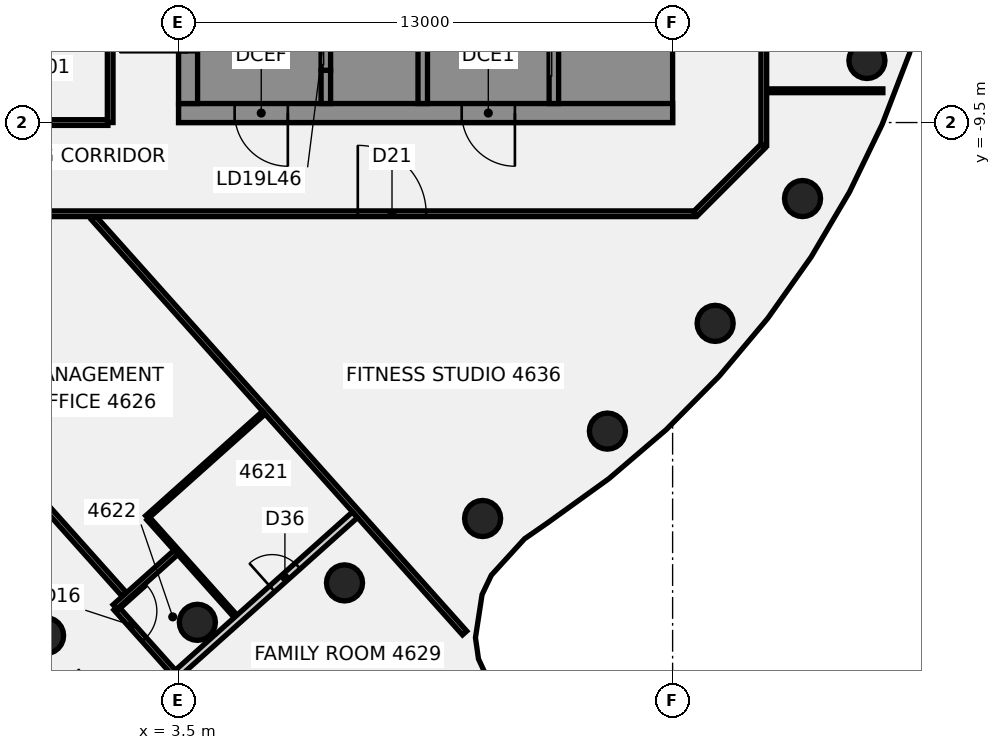
"""IFC4 building model, lengths in metres.
Left out: names, types, materials, properties, quantities, classifications, styles, units other than length and angle.
Written with IfcOpenShell. Run it as: python <this file> out.ifc"""

import sys

from ifc_helpers import new_model, si_unit, direction, frame, frame_2d, origin, origin_2d, place, context, subcontext, project, spatial, polyline, rectangle, circle, outline, extrude, element, fill, save


model = new_model("IFC4")
c1 = context("Model", 3, precision=1e-05, world=origin(), true_north=direction((0.0, 1.0)))
c2 = subcontext(c1, "Body", "Model", "MODEL_VIEW")
j1 = project(units=[si_unit("LENGTHUNIT", "METRE"), si_unit("PLANEANGLEUNIT", "RADIAN")], contexts=[c1])
p1 = place(None, origin())
s1 = spatial("IfcSite", under=j1, at=p1, CompositionType="ELEMENT")
p2 = place(p1, origin())
s2 = spatial("IfcBuilding", under=s1, at=p2, CompositionType="ELEMENT")
p3 = place(p2, frame((0.0, 0.0, 186.1)))
s3 = spatial("IfcBuildingStorey", under=s2, at=p3, CompositionType="ELEMENT", Elevation=186.1)
for number, where, z_axis, x_axis in (
    (1, (0.0, -23.0, -0.14), (0.0, 0.0, 1.0), (1.0, 0.0, 0.0)),
    (2, (3.994, -22.651, -0.14), (0.0, 0.0, 1.0), (1.0, 0.0, 0.0)),
    (3, (7.866, -21.613, -0.14), (0.0, 0.0, 1.0), (1.0, 0.0, 0.0)),
    (4, (11.5, -19.919, -0.14), (0.0, 0.0, 1.0), (1.0, 0.0, 0.0)),
    (5, (14.784, -17.619, -0.14), (0.0, 0.0, 1.0), (1.0, 0.0, 0.0)),
    (6, (17.619, -14.784, -0.14), (0.0, 0.0, 1.0), (1.0, 0.0, 0.0)),
    (7, (19.919, -11.5, -0.14), (0.0, 0.0, 1.0), (1.0, 0.0, 0.0)),
    (8, (21.613, -7.866, -0.14), (0.0, 0.0, 1.0), (1.0, 0.0, 0.0)),
):
    element("IfcColumn", number, at=place(p3, frame(where, z_axis=z_axis, x_axis=x_axis)), inside=s3, PredefinedType="COLUMN", context=c2, shape_type="SweptSolid", body=[
        extrude(circle(Radius=0.475, at=origin_2d()), origin(), (0.0, 0.0, 1.0), 3.6),
    ])
p4 = place(p3, frame((9.632, -24.523, -0.139), z_axis=(0.012268116842, 0.048801348764, 0.99873315839), x_axis=(-0.744800990849, -0.66598299183, 0.041690989716)))
e9 = element("IfcColumn", 9, at=p4, inside=s3, PredefinedType="COLUMN", context=c2, shape_type="SweptSolid", body=[
    extrude(rectangle(XDim=0.9, YDim=0.9, at=origin_2d()), origin(), (0.0, 0.0, 1.0), 3.602),
])
p5 = place(p3, frame((-6.785, -12.008, 0.0), z_axis=(0.0, 0.0, 1.0), x_axis=(0.666416805169, -0.745579400056, 0.0)))
e10 = element("IfcWall", 10, at=p5, inside=s3, PredefinedType="PARTITIONING", context=c2, shape_type="SweptSolid", body=[
    extrude(rectangle(XDim=13.292, YDim=0.15, at=frame_2d((6.646, 0.0))), origin(), (0.0, 0.0, 1.0), 2.864),
])
p6 = place(p5, frame((4.355, 0.0, 0.0)))
e11 = element("IfcOpeningElement", 11, at=p6, cuts=e10, PredefinedType="OPENING", context=c2, shape_type="SweptSolid", body=[
    extrude(rectangle(XDim=0.9, YDim=2.1, at=frame_2d((0.45, 1.05))), frame((0.0, 0.085, 0.0), z_axis=(0.0, -1.0, 0.0), x_axis=(1.0, 0.0, 0.0)), (0.0, 0.0, 1.0), 0.17),
])
p7 = place(p3, frame((1.263, -12.008, 0.0), z_axis=(0.0, 0.0, 1.0), x_axis=(0.666447481512, -0.745551979668, 0.0)))
e12 = element("IfcWall", 12, at=p7, inside=s3, PredefinedType="PARTITIONING", context=c2, shape_type="SweptSolid", body=[
    extrude(rectangle(XDim=14.651, YDim=0.15, at=frame_2d((7.325, 0.0))), origin(), (0.0, 0.0, 1.0), 2.864),
])
p8 = place(p3, frame((1.855, -22.274, 0.0), z_axis=(0.0, 0.0, 1.0), x_axis=(0.666398150621, -0.74559607352, 0.0)))
e13 = element("IfcWall", 13, at=p8, inside=s3, PredefinedType="PARTITIONING", context=c2, shape_type="SweptSolid", body=[
    extrude(rectangle(XDim=15.78, YDim=0.15, at=frame_2d((7.89, 0.0))), origin(), (0.0, 0.0, 1.0), 2.864),
])
p9 = place(p8, frame((0.11, 0.0, 0.0)))
e14 = element("IfcOpeningElement", 14, at=p9, cuts=e13, PredefinedType="OPENING", context=c2, shape_type="SweptSolid", body=[
    extrude(rectangle(XDim=1.0, YDim=2.1, at=frame_2d((0.5, 1.05))), frame((0.0, 0.085, 0.0), z_axis=(0.0, -1.0, 0.0), x_axis=(1.0, 0.0, 0.0)), (0.0, 0.0, 1.0), 0.17),
])
p10 = place(p8, frame((6.26, 0.0, 0.0)))
e15 = element("IfcOpeningElement", 15, at=p10, cuts=e13, PredefinedType="OPENING", context=c2, shape_type="SweptSolid", body=[
    extrude(rectangle(XDim=0.9, YDim=2.1, at=frame_2d((0.45, 1.05))), frame((0.0, 0.085, 0.0), z_axis=(0.0, -1.0, 0.0), x_axis=(1.0, 0.0, 0.0)), (0.0, 0.0, 1.0), 0.17),
])
p11 = place(p8, frame((14.31, 0.0, 0.0)))
e16 = element("IfcOpeningElement", 16, at=p11, cuts=e13, PredefinedType="OPENING", context=c2, shape_type="SweptSolid", body=[
    extrude(rectangle(XDim=0.9, YDim=2.1, at=frame_2d((0.45, 1.05))), frame((0.0, 0.085, 0.0), z_axis=(0.0, -1.0, 0.0), x_axis=(1.0, 0.0, 0.0)), (0.0, 0.0, 1.0), 0.17),
])
p12 = place(p3, frame((2.705, -19.924, 0.0), z_axis=(0.0, 0.0, 1.0), x_axis=(0.666455053582, -0.74554521094, 0.0)))
e17 = element("IfcWall", 17, at=p12, inside=s3, PredefinedType="PARTITIONING", context=c2, shape_type="SweptSolid", body=[
    extrude(rectangle(XDim=3.445, YDim=0.1, at=frame_2d((1.722, 0.0))), origin(), (0.0, 0.0, 1.0), 2.864),
])
p13 = place(p3, frame((-17.1, -11.9, 0.0), z_axis=(0.0, 0.0, 1.0), x_axis=(1.0, 0.0, 0.0)))
e18 = element("IfcWall", 18, at=p13, inside=s3, PredefinedType="PARTITIONING", context=c2, shape_type="SweptSolid", body=[
    extrude(rectangle(XDim=34.165, YDim=0.15, at=frame_2d((17.083, 0.0))), origin(), (0.0, 0.0, 1.0), 2.864),
])
p14 = place(p13, frame((7.992, 0.0, 0.0)))
e19 = element("IfcOpeningElement", 19, at=p14, cuts=e18, PredefinedType="OPENING", context=c2, shape_type="SweptSolid", body=[
    extrude(rectangle(XDim=1.8, YDim=2.1, at=frame_2d((0.9, 1.05))), frame((0.0, 0.085, 0.0), z_axis=(0.0, -1.0, 0.0), x_axis=(1.0, 0.0, 0.0)), (0.0, 0.0, 1.0), 0.17),
])
p15 = place(p13, frame((2.1, 0.0, 0.0)))
e20 = element("IfcOpeningElement", 20, at=p15, cuts=e18, PredefinedType="OPENING", context=c2, shape_type="SweptSolid", body=[
    extrude(rectangle(XDim=1.8, YDim=2.1, at=frame_2d((0.9, 1.05))), frame((0.0, 0.085, 0.0), z_axis=(0.0, -1.0, 0.0), x_axis=(1.0, 0.0, 0.0)), (0.0, 0.0, 1.0), 0.17),
])
p16 = place(p13, frame((25.316, 0.0, 0.0)))
e21 = element("IfcOpeningElement", 21, at=p16, cuts=e18, PredefinedType="OPENING", context=c2, shape_type="SweptSolid", body=[
    extrude(rectangle(XDim=1.8, YDim=2.1, at=frame_2d((0.9, 1.05))), frame((0.0, 0.085, 0.0), z_axis=(0.0, -1.0, 0.0), x_axis=(1.0, 0.0, 0.0)), (0.0, 0.0, 1.0), 0.17),
])
p17 = place(p3, frame((-1.64, -9.5, 0.0), z_axis=(0.0, 0.0, 1.0), x_axis=(1.0, 0.0, 0.0)))
e22 = element("IfcWall", 22, at=p17, inside=s3, PredefinedType="PARTITIONING", context=c2, shape_type="SweptSolid", body=[
    extrude(rectangle(XDim=3.28, YDim=0.15, at=frame_2d((1.64, 0.0))), origin(), (0.0, 0.0, 1.0), 2.864),
])
p18 = place(p3, frame((18.955, -8.664, 0.0), z_axis=(0.0, 0.0, 1.0), x_axis=(1.0, 0.0, 0.0)))
e23 = element("IfcWall", 23, at=p18, inside=s3, PredefinedType="PARTITIONING", context=c2, shape_type="SweptSolid", body=[
    extrude(rectangle(XDim=3.078, YDim=0.1, at=frame_2d((1.539, 0.0))), origin(), (0.0, 0.0, 1.0), 2.864),
])
p19 = place(p3, frame((2.668, -19.883, 0.0), z_axis=(0.0, 0.0, 1.0), x_axis=(0.745587906821, 0.666407287777, 0.0)))
e24 = element("IfcWall", 24, at=p19, inside=s3, PredefinedType="PARTITIONING", context=c2, shape_type="SweptSolid", body=[
    extrude(rectangle(XDim=4.125, YDim=0.1, at=frame_2d((2.063, 0.0))), origin(), (0.0, 0.0, 1.0), 2.864),
])
p20 = place(p3, frame((-2.388, -29.231, 0.0), z_axis=(0.0, 0.0, 1.0), x_axis=(0.745635079119, 0.666354506841, 0.0)))
e25 = element("IfcWall", 25, at=p20, inside=s3, PredefinedType="PARTITIONING", context=c2, shape_type="SweptSolid", body=[
    extrude(rectangle(XDim=14.119, YDim=0.2, at=frame_2d((7.06, 0.0))), origin(), (0.0, 0.0, 1.0), 2.864),
])
p21 = place(p20, frame((5.699, 0.0, 0.0)))
e26 = element("IfcOpeningElement", 26, at=p21, cuts=e25, PredefinedType="OPENING", context=c2, shape_type="SweptSolid", body=[
    extrude(rectangle(XDim=1.4, YDim=2.1, at=frame_2d((0.7, 1.05))), frame((0.0, 0.11, 0.0), z_axis=(0.0, -1.0, 0.0), x_axis=(1.0, 0.0, 0.0)), (0.0, 0.0, 1.0), 0.22),
])
p22 = place(p20, frame((11.199, 0.0, 0.0)))
e27 = element("IfcOpeningElement", 27, at=p22, cuts=e25, PredefinedType="OPENING", context=c2, shape_type="SweptSolid", body=[
    extrude(rectangle(XDim=0.9, YDim=2.1, at=frame_2d((0.45, 1.05))), frame((0.0, 0.11, 0.0), z_axis=(0.0, -1.0, 0.0), x_axis=(1.0, 0.0, 0.0)), (0.0, 0.0, 1.0), 0.22),
])
p23 = place(p20, frame((1.579, 0.0, 0.0)))
e28 = element("IfcOpeningElement", 28, at=p23, cuts=e25, PredefinedType="OPENING", context=c2, shape_type="SweptSolid", body=[
    extrude(rectangle(XDim=0.9, YDim=2.1, at=frame_2d((0.45, 1.05))), frame((0.0, 0.11, 0.0), z_axis=(0.0, -1.0, 0.0), x_axis=(1.0, 0.0, 0.0)), (0.0, 0.0, 1.0), 0.22),
])
p24 = place(p3, frame((1.827, -22.243, 0.0), z_axis=(0.0, 0.0, 1.0), x_axis=(0.74553667449, 0.666464602953, 0.0)))
e29 = element("IfcWall", 29, at=p24, inside=s3, PredefinedType="PARTITIONING", context=c2, shape_type="SweptSolid", body=[
    extrude(rectangle(XDim=2.14, YDim=0.15, at=frame_2d((1.07, 0.0))), origin(), (0.0, 0.0, 1.0), 2.864),
])
p25 = place(p3, frame((17.1, -11.9, 0.0), z_axis=(0.0, 0.0, 1.0), x_axis=(0.707106781187, 0.707106781187, 0.0)))
e30 = element("IfcWall", 30, at=p25, inside=s3, PredefinedType="PARTITIONING", context=c2, shape_type="SweptSolid", body=[
    extrude(rectangle(XDim=2.505, YDim=0.15, at=frame_2d((1.253, 0.0))), origin(), (0.0, 0.0, 1.0), 2.864),
])
p26 = place(p3, frame((1.7, -9.5, 0.0), z_axis=(0.0, 0.0, 1.0), x_axis=(0.0, 1.0, 0.0)))
e31 = element("IfcWall", 31, at=p26, inside=s3, PredefinedType="PARTITIONING", context=c2, shape_type="SweptSolid", body=[
    extrude(rectangle(XDim=19.0, YDim=0.15, at=frame_2d((9.5, 0.0))), origin(), (0.0, 0.0, 1.0), 2.864),
])
p27 = place(p3, frame((18.9, -10.1, 0.0), z_axis=(0.0, 0.0, 1.0), x_axis=(0.0, 1.0, 0.0)))
e32 = element("IfcWall", 32, at=p27, inside=s3, PredefinedType="PARTITIONING", context=c2, shape_type="SweptSolid", body=[
    extrude(rectangle(XDim=20.2, YDim=0.15, at=frame_2d((10.1, 0.0))), origin(), (0.0, 0.0, 1.0), 2.864),
])
p28 = place(p27, frame((18.232, 0.0, 0.0)))
e33 = element("IfcOpeningElement", 33, at=p28, cuts=e32, PredefinedType="OPENING", context=c2, shape_type="SweptSolid", body=[
    extrude(rectangle(XDim=0.9, YDim=2.1, at=frame_2d((0.45, 1.05))), frame((0.0, 0.085, 0.0), z_axis=(0.0, -1.0, 0.0), x_axis=(1.0, 0.0, 0.0)), (0.0, 0.0, 1.0), 0.17),
])
p29 = place(p27, frame((10.286, 0.0, 0.0)))
e34 = element("IfcOpeningElement", 34, at=p29, cuts=e32, PredefinedType="OPENING", context=c2, shape_type="SweptSolid", body=[
    extrude(rectangle(XDim=1.8, YDim=2.1, at=frame_2d((0.9, 1.05))), frame((0.0, 0.085, 0.0), z_axis=(0.0, -1.0, 0.0), x_axis=(1.0, 0.0, 0.0)), (0.0, 0.0, 1.0), 0.17),
])
p30 = place(p27, frame((5.486, 0.0, 0.0)))
e35 = element("IfcOpeningElement", 35, at=p30, cuts=e32, PredefinedType="OPENING", context=c2, shape_type="SweptSolid", body=[
    extrude(rectangle(XDim=1.8, YDim=2.1, at=frame_2d((0.9, 1.05))), frame((0.0, 0.085, 0.0), z_axis=(0.0, -1.0, 0.0), x_axis=(1.0, 0.0, 0.0)), (0.0, 0.0, 1.0), 0.17),
])
p31 = place(p3, frame((16.5, -9.25, 0.0), z_axis=(0.0, 0.0, 1.0), x_axis=(-1.0, 0.0, 0.0)))
e36 = element("IfcWall", 36, at=p31, inside=s3, PredefinedType="SHEAR", context=c2, shape_type="SweptSolid", body=[
    extrude(rectangle(XDim=13.0, YDim=0.5, at=frame_2d((6.5, 0.0))), origin(), (0.0, 0.0, 1.0), 3.46),
])
p32 = place(p31, frame((4.15, 0.0, 0.0)))
e37 = element("IfcOpeningElement", 37, at=p32, cuts=e36, PredefinedType="OPENING", context=c2, shape_type="SweptSolid", body=[
    extrude(rectangle(XDim=1.4, YDim=2.1, at=frame_2d((0.7, 1.05))), frame((0.0, 0.26, 0.0), z_axis=(0.0, -1.0, 0.0), x_axis=(1.0, 0.0, 0.0)), (0.0, 0.0, 1.0), 0.52),
])
p33 = place(p31, frame((10.125, 0.0, 0.0)))
e38 = element("IfcOpeningElement", 38, at=p33, cuts=e36, PredefinedType="OPENING", context=c2, shape_type="SweptSolid", body=[
    extrude(rectangle(XDim=1.4, YDim=2.1, at=frame_2d((0.7, 1.05))), frame((0.0, 0.26, 0.0), z_axis=(0.0, -1.0, 0.0), x_axis=(1.0, 0.0, 0.0)), (0.0, 0.0, 1.0), 0.52),
])
p34 = place(p3, origin())
e39 = element("IfcWall", 39, at=p34, inside=s3, PredefinedType="SHEAR", context=c2, shape_type="SweptSolid", body=[
    extrude(outline(polyline([(13.5, -8.125), (13.5, -9.0), (16.0, -9.0), (16.5, -9.0), (16.5, 9.0), (16.0, 9.0), (13.5, 9.0), (13.5, 8.125), (16.0, 8.125), (16.0, 5.625), (13.5, 5.625), (13.5, 5.375), (16.0, 5.375), (16.0, -5.375), (13.5, -5.375), (13.5, -5.625), (16.0, -5.625), (16.0, -8.125), (13.5, -8.125)])), origin(), (0.0, 0.0, 1.0), 3.46),
])
p35 = place(p3, origin())
e40 = element("IfcWall", 40, at=p35, inside=s3, PredefinedType="SHEAR", context=c2, shape_type="SweptSolid", body=[
    extrude(outline(polyline([(7.5, -8.125), (7.5, -9.0), (9.8, -9.0), (9.8, -8.125), (9.8, -5.625), (9.55, -5.625), (9.55, -8.125), (7.5, -8.125)])), origin(), (0.0, 0.0, 1.0), 3.46),
])
p36 = place(p3, frame((7.375, -9.0, 0.0), z_axis=(0.0, 0.0, 1.0), x_axis=(0.0, 1.0, 0.0)))
e41 = element("IfcWall", 41, at=p36, inside=s3, PredefinedType="SHEAR", context=c2, shape_type="SweptSolid", body=[
    extrude(rectangle(XDim=0.875, YDim=0.25, at=frame_2d((0.438, 0.0))), origin(), (0.0, 0.0, 1.0), 3.46),
])
p37 = place(p3, frame((13.375, -9.0, 0.0), z_axis=(0.0, 0.0, 1.0), x_axis=(0.0, 1.0, 0.0)))
e42 = element("IfcWall", 42, at=p37, inside=s3, PredefinedType="SHEAR", context=c2, shape_type="SweptSolid", body=[
    extrude(rectangle(XDim=18.0, YDim=0.25, at=frame_2d((9.0, 0.0))), origin(), (0.0, 0.0, 1.0), 3.46),
])
p38 = place(p37, frame((1.425, 0.0, 0.0)))
e43 = element("IfcOpeningElement", 43, at=p38, cuts=e42, PredefinedType="OPENING", context=c2, shape_type="SweptSolid", body=[
    extrude(rectangle(XDim=1.4, YDim=2.1, at=frame_2d((0.7, 1.05))), frame((0.0, 0.135, 0.0), z_axis=(0.0, -1.0, 0.0), x_axis=(1.0, 0.0, 0.0)), (0.0, 0.0, 1.0), 0.27),
])
p39 = place(p37, frame((8.5, 0.0, 0.0)))
e44 = element("IfcOpeningElement", 44, at=p39, cuts=e42, PredefinedType="OPENING", context=c2, shape_type="SweptSolid", body=[
    extrude(rectangle(XDim=1.0, YDim=2.1, at=frame_2d((0.5, 1.05))), frame((0.0, 0.135, 0.0), z_axis=(0.0, -1.0, 0.0), x_axis=(1.0, 0.0, 0.0)), (0.0, 0.0, 1.0), 0.27),
])
p40 = place(p3, frame((9.925, -9.0, 0.0), z_axis=(0.0, 0.0, 1.0), x_axis=(0.0, 1.0, 0.0)))
e45 = element("IfcWall", 45, at=p40, inside=s3, PredefinedType="SHEAR", context=c2, shape_type="SweptSolid", body=[
    extrude(rectangle(XDim=18.0, YDim=0.25, at=frame_2d((9.0, 0.0))), origin(), (0.0, 0.0, 1.0), 3.46),
])
p41 = place(p40, frame((4.275, 0.0, 0.0)))
e46 = element("IfcOpeningElement", 46, at=p41, cuts=e45, PredefinedType="OPENING", context=c2, shape_type="SweptSolid", body=[
    extrude(rectangle(XDim=1.2, YDim=2.1, at=frame_2d((0.6, 1.05))), frame((0.0, 0.135, 0.0), z_axis=(0.0, -1.0, 0.0), x_axis=(1.0, 0.0, 0.0)), (0.0, 0.0, 1.0), 0.27),
])
p42 = place(p40, frame((7.025, 0.0, 0.0)))
e47 = element("IfcOpeningElement", 47, at=p42, cuts=e45, PredefinedType="OPENING", context=c2, shape_type="SweptSolid", body=[
    extrude(rectangle(XDim=1.2, YDim=2.1, at=frame_2d((0.6, 1.05))), frame((0.0, 0.135, 0.0), z_axis=(0.0, -1.0, 0.0), x_axis=(1.0, 0.0, 0.0)), (0.0, 0.0, 1.0), 0.27),
])
p43 = place(p40, frame((9.825, 0.0, 0.0)))
e48 = element("IfcOpeningElement", 48, at=p43, cuts=e45, PredefinedType="OPENING", context=c2, shape_type="SweptSolid", body=[
    extrude(rectangle(XDim=1.1, YDim=2.1, at=frame_2d((0.55, 1.05))), frame((0.0, 0.135, 0.0), z_axis=(0.0, -1.0, 0.0), x_axis=(1.0, 0.0, 0.0)), (0.0, 0.0, 1.0), 0.27),
])
p44 = place(p3, frame((7.375, -8.125, 0.0), z_axis=(0.0, 0.0, 1.0), x_axis=(0.0, 1.0, 0.0)))
e49 = element("IfcWall", 49, at=p44, inside=s3, PredefinedType="SHEAR", context=c2, shape_type="SweptSolid", body=[
    extrude(rectangle(XDim=2.5, YDim=0.25, at=frame_2d((1.25, 0.0))), origin(), (0.0, 0.0, 1.0), 3.46),
])
p45 = place(p44, frame((0.7, 0.0, 0.0)))
e50 = element("IfcOpeningElement", 50, at=p45, cuts=e49, PredefinedType="OPENING", context=c2, shape_type="SweptSolid", body=[
    extrude(rectangle(XDim=1.1, YDim=2.1, at=frame_2d((0.55, 1.05))), frame((0.0, 0.135, 0.0), z_axis=(0.0, -1.0, 0.0), x_axis=(1.0, 0.0, 0.0)), (0.0, 0.0, 1.0), 0.27),
])
p46 = place(p3, frame((3.75, -9.0, 0.0), z_axis=(0.0, 0.0, 1.0), x_axis=(0.0, 1.0, 0.0)))
e51 = element("IfcWall", 51, at=p46, inside=s3, PredefinedType="SHEAR", context=c2, shape_type="SweptSolid", body=[
    extrude(rectangle(XDim=18.0, YDim=0.5, at=frame_2d((9.0, 0.0))), origin(), (0.0, 0.0, 1.0), 3.46),
])
p47 = place(p46, frame((1.35, 0.0, 0.0)))
e52 = element("IfcOpeningElement", 52, at=p47, cuts=e51, PredefinedType="OPENING", context=c2, shape_type="SweptSolid", body=[
    extrude(rectangle(XDim=1.8, YDim=2.1, at=frame_2d((0.9, 1.05))), frame((0.0, 0.26, 0.0), z_axis=(0.0, -1.0, 0.0), x_axis=(1.0, 0.0, 0.0)), (0.0, 0.0, 1.0), 0.52),
])
p48 = place(p46, frame((11.798, 0.0, 0.0)))
e53 = element("IfcOpeningElement", 53, at=p48, cuts=e51, PredefinedType="OPENING", context=c2, shape_type="SweptSolid", body=[
    extrude(rectangle(XDim=1.0, YDim=2.1, at=frame_2d((0.5, 1.05))), frame((0.0, 0.26, 0.0), z_axis=(0.0, -1.0, 0.0), x_axis=(1.0, 0.0, 0.0)), (0.0, 0.0, 1.0), 0.52),
])
p49 = place(p46, frame((15.323, 0.0, 0.0)))
e54 = element("IfcOpeningElement", 54, at=p49, cuts=e51, PredefinedType="OPENING", context=c2, shape_type="SweptSolid", body=[
    extrude(rectangle(XDim=1.0, YDim=2.1, at=frame_2d((0.5, 1.05))), frame((0.0, 0.26, 0.0), z_axis=(0.0, -1.0, 0.0), x_axis=(1.0, 0.0, 0.0)), (0.0, 0.0, 1.0), 0.52),
])
p50 = place(p9, origin())
e55 = element("IfcDoor", 55, at=p50, inside=s3, OperationType="SINGLE_SWING_RIGHT", PredefinedType="DOOR", context=c2, shape_type="SweptSolid", body=[
    extrude(rectangle(XDim=1.0, YDim=2.1, at=frame_2d((0.5, 1.05))), frame((0.0, 0.025, 0.0), z_axis=(0.0, -1.0, 0.0), x_axis=(1.0, 0.0, 0.0)), (0.0, 0.0, 1.0), 0.05),
])
fill(e14, e55)
p51 = place(p16, frame((1.8, 0.0, 0.0), z_axis=(0.0, 0.0, 1.0), x_axis=(-1.0, 0.0, 0.0)))
e56 = element("IfcDoor", 56, at=p51, inside=s3, OperationType="DOUBLE_DOOR_SINGLE_SWING", PredefinedType="DOOR", context=c2, shape_type="SweptSolid", body=[
    extrude(rectangle(XDim=1.8, YDim=2.1, at=frame_2d((0.9, 1.05))), frame((0.0, 0.025, 0.0), z_axis=(0.0, -1.0, 0.0), x_axis=(1.0, 0.0, 0.0)), (0.0, 0.0, 1.0), 0.05),
])
fill(e21, e56)
p52 = place(p22, origin())
e57 = element("IfcDoor", 57, at=p52, inside=s3, OperationType="SINGLE_SWING_LEFT", PredefinedType="DOOR", context=c2, shape_type="SweptSolid", body=[
    extrude(rectangle(XDim=0.9, YDim=2.1, at=frame_2d((0.45, 1.05))), frame((0.0, 0.025, 0.0), z_axis=(0.0, -1.0, 0.0), x_axis=(1.0, 0.0, 0.0)), (0.0, 0.0, 1.0), 0.05),
])
fill(e27, e57)
p53 = place(p32, origin())
e58 = element("IfcDoor", 58, at=p53, inside=s3, OperationType="SINGLE_SWING_LEFT", PredefinedType="DOOR", context=c2, shape_type="SweptSolid", body=[
    extrude(rectangle(XDim=1.4, YDim=2.1, at=frame_2d((0.7, 1.05))), frame((0.0, 0.025, 0.0), z_axis=(0.0, -1.0, 0.0), x_axis=(1.0, 0.0, 0.0)), (0.0, 0.0, 1.0), 0.05),
])
fill(e37, e58)
p54 = place(p33, origin())
e59 = element("IfcDoor", 59, at=p54, inside=s3, OperationType="SINGLE_SWING_LEFT", PredefinedType="DOOR", context=c2, shape_type="SweptSolid", body=[
    extrude(rectangle(XDim=1.4, YDim=2.1, at=frame_2d((0.7, 1.05))), frame((0.0, 0.025, 0.0), z_axis=(0.0, -1.0, 0.0), x_axis=(1.0, 0.0, 0.0)), (0.0, 0.0, 1.0), 0.05),
])
fill(e38, e59)
save(model, sys.argv[1])
